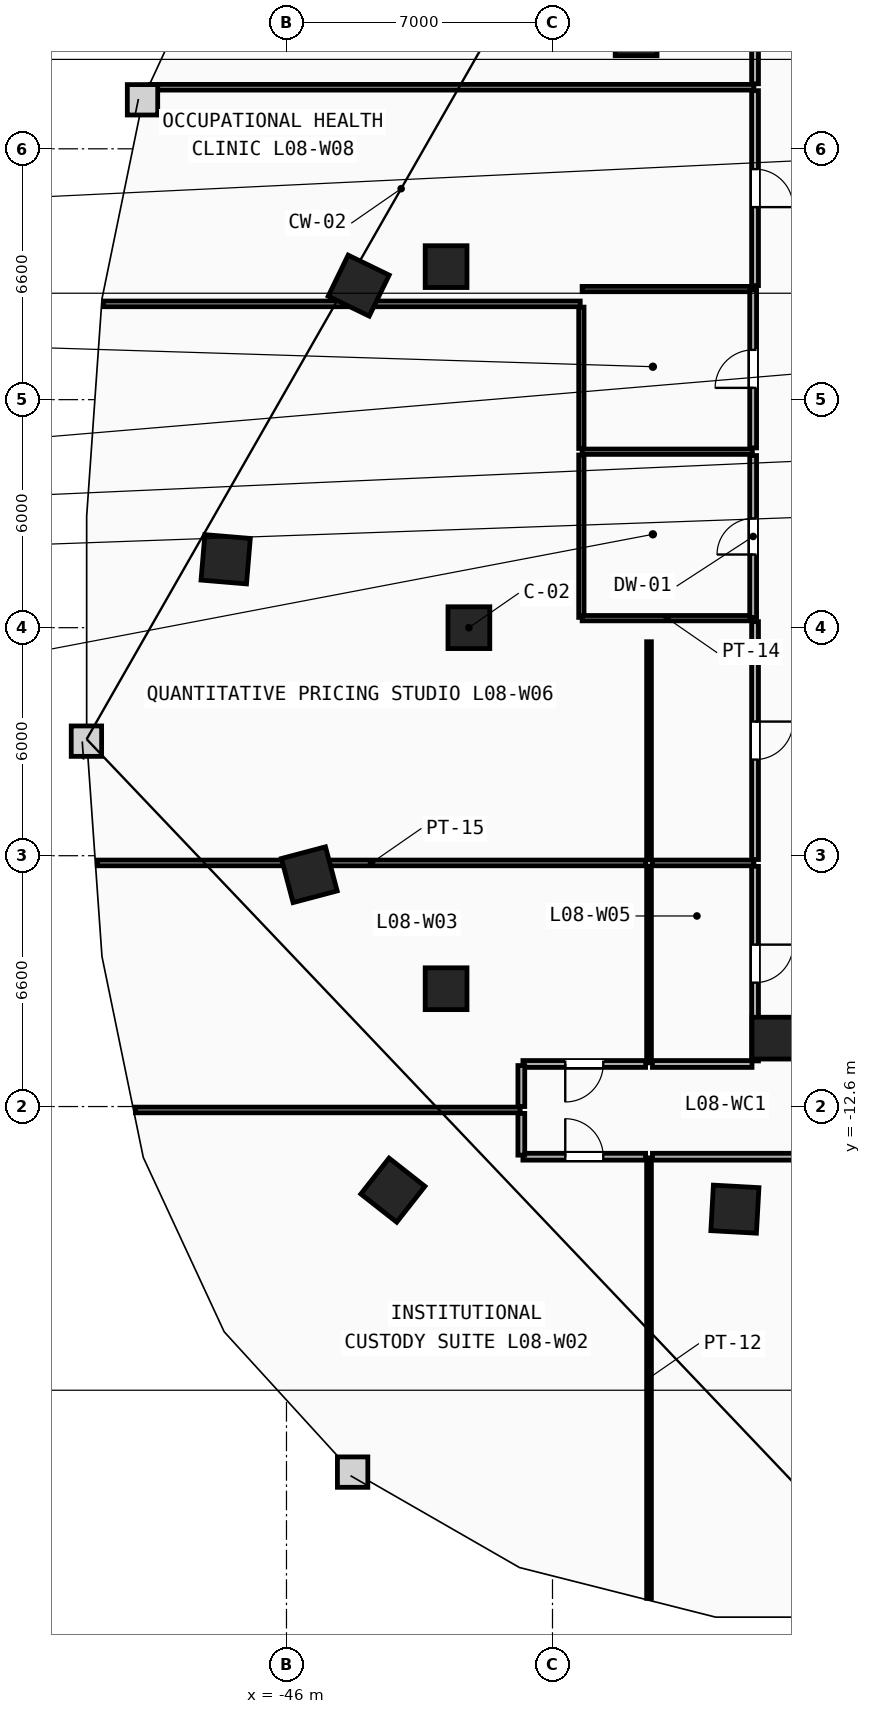
"""IFC4 building model, lengths in metres.
Left out: names, types, materials, properties, quantities, classifications, styles, units other than length and angle.
Written with IfcOpenShell. Run it as: python <this file> out.ifc"""

import sys

from ifc_helpers import new_model, si_unit, direction, frame, frame_2d, origin, origin_2d, place, context, subcontext, project, spatial, rectangle, extrude, element, fill, save


model = new_model("IFC4")
c1 = context("Model", 3, precision=1e-05, world=origin(), true_north=direction((0.0, 1.0)))
c2 = subcontext(c1, "Body", "Model", "MODEL_VIEW")
j1 = project(units=[si_unit("LENGTHUNIT", "METRE"), si_unit("PLANEANGLEUNIT", "RADIAN")], contexts=[c1])
p1 = place(None, origin())
s1 = spatial("IfcSite", under=j1, at=p1, CompositionType="ELEMENT")
p2 = place(p1, origin())
s2 = spatial("IfcBuilding", under=s1, at=p2, CompositionType="ELEMENT")
p3 = place(p2, frame((0.0, 0.0, 35.4)))
s3 = spatial("IfcBuildingStorey", under=s2, at=p3, CompositionType="ELEMENT", Elevation=35.4)
for number, where, z_axis, x_axis in (
    (1, (-41.2, 0.0, 0.0), (0.0, 0.0, 1.0), (1.0, 0.0, 0.0)),
    (2, (-41.8, 9.5, 0.0), (0.0, 0.0, 1.0), (1.0, 0.0, 0.0)),
    (3, (-36.8, 15.6, 0.0), (0.0, 0.0, 1.0), (1.0, 0.0, 0.0)),
    (4, (-41.8, -9.5, 0.0), (0.0, 0.0, 1.0), (1.0, 0.0, 0.0)),
    (5, (-33.2, -10.8, 0.0), (0.0, 0.0, 1.0), (1.0, 0.0, 0.0)),
):
    element("IfcColumn", number, at=place(p3, frame(where, z_axis=z_axis, x_axis=x_axis)), inside=s3, PredefinedType="COLUMN", context=c2, shape_type="SweptSolid", body=[
        extrude(rectangle(XDim=1.1, YDim=1.1, at=origin_2d()), origin(), (0.0, 0.0, 1.0), 3.8),
    ])
for number, where, z_axis, x_axis in (
    (6, (-44.1, 9.0, 0.0), (0.0, 0.0, 1.0), (-0.437, -0.899, 0.0)),
    (7, (-47.6, 1.8, 0.0), (0.0, 0.0, 1.0), (-0.084, -0.997, 0.0)),
    (8, (-45.4, -6.5, 0.0), (0.0, 0.0, 1.0), (0.256, -0.967, 0.0)),
    (9, (-43.2, -14.8, 0.0), (0.0, 0.0, 1.0), (0.786, -0.618, 0.0)),
    (10, (-34.2, -15.3, 0.0), (0.0, 0.0, 1.0), (0.998, -0.055, 0.0)),
):
    element("IfcColumn", number, at=place(p3, frame(where, z_axis=z_axis, x_axis=x_axis)), inside=s3, PredefinedType="COLUMN", context=c2, shape_type="SweptSolid", body=[
        extrude(rectangle(XDim=1.2, YDim=1.2, at=origin_2d()), origin(), (0.0, 0.0, 1.0), 3.8),
    ])
p4 = place(p3, frame((-38.24, 0.27, 0.0), z_axis=(0.0, 0.0, 1.0), x_axis=(0.0, 1.0, 0.0)))
e11 = element("IfcWall", 11, at=p4, inside=s3, PredefinedType="PARTITIONING", context=c2, shape_type="SweptSolid", body=[
    extrude(rectangle(XDim=4.275, YDim=0.14, at=frame_2d((2.137, 0.0))), origin(), (0.0, 0.0, 1.0), 3.5),
])
p5 = place(p3, frame((-38.24, 4.715, 0.0), z_axis=(0.0, 0.0, 1.0), x_axis=(0.0, 1.0, 0.0)))
e12 = element("IfcWall", 12, at=p5, inside=s3, PredefinedType="PARTITIONING", context=c2, shape_type="SweptSolid", body=[
    extrude(rectangle(XDim=3.72, YDim=0.14, at=frame_2d((1.86, 0.0))), origin(), (0.0, 0.0, 1.0), 3.5),
])
for number, where, z_axis, x_axis in (
    (13, (-38.22, 0.25, 0.0), (0.0, 0.0, 1.0), (1.0, 0.0, 0.0)),
    (14, (-38.22, 4.63, 0.0), (0.0, 0.0, 1.0), (1.0, 0.0, 0.0)),
    (15, (-38.22, 8.91, 0.0), (0.0, 0.0, 1.0), (1.0, 0.0, 0.0)),
):
    element("IfcWall", number, at=place(p3, frame(where, z_axis=z_axis, x_axis=x_axis)), inside=s3, PredefinedType="PARTITIONING", context=c2, shape_type="SweptSolid", body=[
        extrude(rectangle(XDim=4.48, YDim=0.14, at=frame_2d((2.24, 0.0))), origin(), (0.0, 0.0, 1.0), 3.5),
    ])
p6 = place(p3, frame((-33.72, 0.27, 0.0), z_axis=(0.0, 0.0, 1.0), x_axis=(0.0, 1.0, 0.0)))
e16 = element("IfcWall", 16, at=p6, inside=s3, PredefinedType="PARTITIONING", context=c2, shape_type="SweptSolid", body=[
    extrude(rectangle(XDim=4.26, YDim=0.18, at=frame_2d((2.13, 0.0))), origin(), (0.0, 0.0, 1.0), 3.5),
])
p7 = place(p6, frame((1.655, 0.0, 0.0)))
e17 = element("IfcOpeningElement", 17, at=p7, cuts=e16, PredefinedType="OPENING", context=c2, shape_type="SweptSolid", body=[
    extrude(rectangle(XDim=0.95, YDim=2.1, at=frame_2d((0.475, 1.05))), frame((0.0, 0.1, 0.0), z_axis=(0.0, -1.0, 0.0), x_axis=(1.0, 0.0, 0.0)), (0.0, 0.0, 1.0), 0.2),
])
p8 = place(p3, frame((-33.72, 4.73, 0.0), z_axis=(0.0, 0.0, 1.0), x_axis=(0.0, 1.0, 0.0)))
e18 = element("IfcWall", 18, at=p8, inside=s3, PredefinedType="PARTITIONING", context=c2, shape_type="SweptSolid", body=[
    extrude(rectangle(XDim=4.16, YDim=0.18, at=frame_2d((2.08, 0.0))), origin(), (0.0, 0.0, 1.0), 3.5),
])
p9 = place(p8, frame((1.58, 0.0, 0.0)))
e19 = element("IfcOpeningElement", 19, at=p9, cuts=e18, PredefinedType="OPENING", context=c2, shape_type="SweptSolid", body=[
    extrude(rectangle(XDim=1.0, YDim=2.15, at=frame_2d((0.5, 1.075))), frame((0.0, 0.1, 0.0), z_axis=(0.0, -1.0, 0.0), x_axis=(1.0, 0.0, 0.0)), (0.0, 0.0, 1.0), 0.2),
])
p10 = place(p3, frame((-36.46, -25.541, 0.0), z_axis=(0.0, 0.0, 1.0), x_axis=(0.0, 1.0, 0.0)))
e20 = element("IfcWall", 20, at=p10, inside=s3, PredefinedType="PARTITIONING", context=c2, shape_type="SweptSolid", body=[
    extrude(rectangle(XDim=11.591, YDim=0.125, at=frame_2d((5.795, 0.0))), origin(), (0.0, 0.0, 1.0), 3.5),
])
p11 = place(p3, frame((-36.46, -11.45, 0.0), z_axis=(0.0, 0.0, 1.0), x_axis=(0.0, 1.0, 0.0)))
e21 = element("IfcWall", 21, at=p11, inside=s3, PredefinedType="PARTITIONING", context=c2, shape_type="SweptSolid", body=[
    extrude(rectangle(XDim=5.175, YDim=0.125, at=frame_2d((2.587, 0.0))), origin(), (0.0, 0.0, 1.0), 3.5),
])
p12 = place(p3, frame((-36.46, -6.105, 0.0), z_axis=(0.0, 0.0, 1.0), x_axis=(0.0, 1.0, 0.0)))
e22 = element("IfcWall", 22, at=p12, inside=s3, PredefinedType="PARTITIONING", context=c2, shape_type="SweptSolid", body=[
    extrude(rectangle(XDim=5.735, YDim=0.125, at=frame_2d((2.867, 0.0))), origin(), (0.0, 0.0, 1.0), 3.5),
])
p13 = place(p3, frame((-50.979, -6.19, 0.0), z_axis=(0.0, 0.0, 1.0), x_axis=(1.0, 0.0, 0.0)))
e23 = element("IfcWall", 23, at=p13, inside=s3, PredefinedType="PARTITIONING", context=c2, shape_type="SweptSolid", body=[
    extrude(rectangle(XDim=14.434, YDim=0.15, at=frame_2d((7.217, 0.0))), origin(), (0.0, 0.0, 1.0), 3.5),
])
p14 = place(p3, frame((-36.375, -6.19, 0.0), z_axis=(0.0, 0.0, 1.0), x_axis=(1.0, 0.0, 0.0)))
e24 = element("IfcWall", 24, at=p14, inside=s3, PredefinedType="PARTITIONING", context=c2, shape_type="SweptSolid", body=[
    extrude(rectangle(XDim=2.675, YDim=0.15, at=frame_2d((1.337, 0.0))), origin(), (0.0, 0.0, 1.0), 3.5),
])
p15 = place(p3, frame((-49.974, -12.69, 0.0), z_axis=(0.0, 0.0, 1.0), x_axis=(1.0, 0.0, 0.0)))
e25 = element("IfcWall", 25, at=p15, inside=s3, PredefinedType="PARTITIONING", context=c2, shape_type="SweptSolid", body=[
    extrude(rectangle(XDim=10.124, YDim=0.15, at=frame_2d((5.062, 0.0))), origin(), (0.0, 0.0, 1.0), 3.5),
])
p16 = place(p3, frame((-50.814, 8.52, 0.0), z_axis=(0.0, 0.0, 1.0), x_axis=(1.0, 0.0, 0.0)))
e26 = element("IfcWall", 26, at=p16, inside=s3, PredefinedType="PARTITIONING", context=c2, shape_type="SweptSolid", body=[
    extrude(rectangle(XDim=12.544, YDim=0.15, at=frame_2d((6.272, 0.0))), origin(), (0.0, 0.0, 1.0), 3.5),
])
p17 = place(p3, frame((-49.585, 14.22, 0.0), z_axis=(0.0, 0.0, 1.0), x_axis=(1.0, 0.0, 0.0)))
e27 = element("IfcWall", 27, at=p17, inside=s3, PredefinedType="PARTITIONING", context=c2, shape_type="SweptSolid", body=[
    extrude(rectangle(XDim=15.885, YDim=0.15, at=frame_2d((7.942, 0.0))), origin(), (0.0, 0.0, 1.0), 3.5),
])
p18 = place(p3, frame((-36.37, -13.92, 0.0), z_axis=(0.0, 0.0, 1.0), x_axis=(1.0, 0.0, 0.0)))
e28 = element("IfcWall", 28, at=p18, inside=s3, PredefinedType="PARTITIONING", context=c2, shape_type="SweptSolid", body=[
    extrude(rectangle(XDim=11.149, YDim=0.18, at=frame_2d((5.574, 0.0))), origin(), (0.0, 0.0, 1.0), 3.5),
])
p19 = place(p18, frame((5.074, 0.0, 0.0)))
e29 = element("IfcOpeningElement", 29, at=p19, cuts=e28, PredefinedType="OPENING", context=c2, shape_type="SweptSolid", body=[
    extrude(rectangle(XDim=1.0, YDim=2.15, at=frame_2d((0.5, 1.075))), frame((0.0, 0.1, 0.0), z_axis=(0.0, -1.0, 0.0), x_axis=(1.0, 0.0, 0.0)), (0.0, 0.0, 1.0), 0.2),
])
p20 = place(p3, frame((-39.779, -13.92, 0.0), z_axis=(0.0, 0.0, 1.0), x_axis=(1.0, 0.0, 0.0)))
e30 = element("IfcWall", 30, at=p20, inside=s3, PredefinedType="PARTITIONING", context=c2, shape_type="SweptSolid", body=[
    extrude(rectangle(XDim=3.229, YDim=0.18, at=frame_2d((1.614, 0.0))), origin(), (0.0, 0.0, 1.0), 3.5),
])
p21 = place(p20, frame((1.114, 0.0, 0.0)))
e31 = element("IfcOpeningElement", 31, at=p21, cuts=e30, PredefinedType="OPENING", context=c2, shape_type="SweptSolid", body=[
    extrude(rectangle(XDim=1.0, YDim=2.15, at=frame_2d((0.5, 1.075))), frame((0.0, 0.1, 0.0), z_axis=(0.0, -1.0, 0.0), x_axis=(1.0, 0.0, 0.0)), (0.0, 0.0, 1.0), 0.2),
])
p22 = place(p3, frame((-39.82, -12.78, 0.0), z_axis=(0.0, 0.0, 1.0), x_axis=(0.0, -1.0, 0.0)))
e32 = element("IfcWall", 32, at=p22, inside=s3, PredefinedType="PARTITIONING", context=c2, shape_type="SweptSolid", body=[
    extrude(rectangle(XDim=1.098, YDim=0.18, at=frame_2d((0.549, 0.0))), origin(), (0.0, 0.0, 1.0), 3.5),
])
p23 = place(p3, frame((-36.55, -11.48, 0.0), z_axis=(0.0, 0.0, 1.0), x_axis=(-1.0, 0.0, 0.0)))
e33 = element("IfcWall", 33, at=p23, inside=s3, PredefinedType="PARTITIONING", context=c2, shape_type="SweptSolid", body=[
    extrude(rectangle(XDim=3.229, YDim=0.18, at=frame_2d((1.614, 0.0))), origin(), (0.0, 0.0, 1.0), 3.5),
])
p24 = place(p23, frame((1.114, 0.0, 0.0)))
e34 = element("IfcOpeningElement", 34, at=p24, cuts=e33, PredefinedType="OPENING", context=c2, shape_type="SweptSolid", body=[
    extrude(rectangle(XDim=1.0, YDim=2.15, at=frame_2d((0.5, 1.075))), frame((0.0, 0.1, 0.0), z_axis=(0.0, -1.0, 0.0), x_axis=(1.0, 0.0, 0.0)), (0.0, 0.0, 1.0), 0.2),
])
p25 = place(p3, frame((-39.82, -11.521, 0.0), z_axis=(0.0, 0.0, 1.0), x_axis=(0.0, -1.0, 0.0)))
e35 = element("IfcWall", 35, at=p25, inside=s3, PredefinedType="PARTITIONING", context=c2, shape_type="SweptSolid", body=[
    extrude(rectangle(XDim=1.079, YDim=0.18, at=frame_2d((0.539, 0.0))), origin(), (0.0, 0.0, 1.0), 3.5),
])
p26 = place(p3, frame((-33.67, -6.28, 0.0), z_axis=(0.0, 0.0, 1.0), x_axis=(0.0, -1.0, 0.0)))
e36 = element("IfcWall", 36, at=p26, inside=s3, PredefinedType="PARTITIONING", context=c2, shape_type="SweptSolid", body=[
    extrude(rectangle(XDim=5.12, YDim=0.18, at=frame_2d((2.56, 0.0))), origin(), (0.0, 0.0, 1.0), 3.5),
])
p27 = place(p26, frame((2.06, 0.0, 0.0)))
e37 = element("IfcOpeningElement", 37, at=p27, cuts=e36, PredefinedType="OPENING", context=c2, shape_type="SweptSolid", body=[
    extrude(rectangle(XDim=1.0, YDim=2.15, at=frame_2d((0.5, 1.075))), frame((0.0, 0.1, 0.0), z_axis=(0.0, -1.0, 0.0), x_axis=(1.0, 0.0, 0.0)), (0.0, 0.0, 1.0), 0.2),
])
p28 = place(p3, frame((-33.75, -11.48, 0.0), z_axis=(0.0, 0.0, 1.0), x_axis=(-1.0, 0.0, 0.0)))
e38 = element("IfcWall", 38, at=p28, inside=s3, PredefinedType="PARTITIONING", context=c2, shape_type="SweptSolid", body=[
    extrude(rectangle(XDim=2.62, YDim=0.18, at=frame_2d((1.31, 0.0))), origin(), (0.0, 0.0, 1.0), 3.5),
])
p29 = place(p3, frame((-33.67, 0.159, 0.0), z_axis=(0.0, 0.0, 1.0), x_axis=(0.0, -1.0, 0.0)))
e39 = element("IfcWall", 39, at=p29, inside=s3, PredefinedType="PARTITIONING", context=c2, shape_type="SweptSolid", body=[
    extrude(rectangle(XDim=6.259, YDim=0.18, at=frame_2d((3.129, 0.0))), origin(), (0.0, 0.0, 1.0), 3.5),
])
p30 = place(p29, frame((2.629, 0.0, 0.0)))
e40 = element("IfcOpeningElement", 40, at=p30, cuts=e39, PredefinedType="OPENING", context=c2, shape_type="SweptSolid", body=[
    extrude(rectangle(XDim=1.0, YDim=2.15, at=frame_2d((0.5, 1.075))), frame((0.0, 0.1, 0.0), z_axis=(0.0, -1.0, 0.0), x_axis=(1.0, 0.0, 0.0)), (0.0, 0.0, 1.0), 0.2),
])
p31 = place(p3, frame((-33.67, 14.13, 0.0), z_axis=(0.0, 0.0, 1.0), x_axis=(0.0, -1.0, 0.0)))
e41 = element("IfcWall", 41, at=p31, inside=s3, PredefinedType="PARTITIONING", context=c2, shape_type="SweptSolid", body=[
    extrude(rectangle(XDim=5.128, YDim=0.18, at=frame_2d((2.564, 0.0))), origin(), (0.0, 0.0, 1.0), 3.5),
])
p32 = place(p31, frame((2.064, 0.0, 0.0)))
e42 = element("IfcOpeningElement", 42, at=p32, cuts=e41, PredefinedType="OPENING", context=c2, shape_type="SweptSolid", body=[
    extrude(rectangle(XDim=1.0, YDim=2.15, at=frame_2d((0.5, 1.075))), frame((0.0, 0.1, 0.0), z_axis=(0.0, -1.0, 0.0), x_axis=(1.0, 0.0, 0.0)), (0.0, 0.0, 1.0), 0.2),
])
p33 = place(p3, frame((-33.67, 17.428, 0.0), z_axis=(0.0, 0.0, 1.0), x_axis=(0.0, -1.0, 0.0)))
e43 = element("IfcWall", 43, at=p33, inside=s3, PredefinedType="PARTITIONING", context=c2, shape_type="SweptSolid", body=[
    extrude(rectangle(XDim=3.118, YDim=0.18, at=frame_2d((1.559, 0.0))), origin(), (0.0, 0.0, 1.0), 3.5),
])
p34 = place(p30, origin())
e44 = element("IfcDoor", 44, at=p34, inside=s3, OperationType="SINGLE_SWING_LEFT", PredefinedType="DOOR", context=c2, shape_type="SweptSolid", body=[
    extrude(rectangle(XDim=1.0, YDim=2.15, at=frame_2d((0.5, 1.075))), frame((0.0, 0.025, 0.0), z_axis=(0.0, -1.0, 0.0), x_axis=(1.0, 0.0, 0.0)), (0.0, 0.0, 1.0), 0.05),
])
fill(e40, e44)
p35 = place(p32, origin())
e45 = element("IfcDoor", 45, at=p35, inside=s3, OperationType="SINGLE_SWING_RIGHT", PredefinedType="DOOR", context=c2, shape_type="SweptSolid", body=[
    extrude(rectangle(XDim=1.0, YDim=2.15, at=frame_2d((0.5, 1.075))), frame((0.0, 0.025, 0.0), z_axis=(0.0, -1.0, 0.0), x_axis=(1.0, 0.0, 0.0)), (0.0, 0.0, 1.0), 0.05),
])
fill(e42, e45)
p36 = place(p27, origin())
e46 = element("IfcDoor", 46, at=p36, inside=s3, OperationType="SINGLE_SWING_LEFT", PredefinedType="DOOR", context=c2, shape_type="SweptSolid", body=[
    extrude(rectangle(XDim=1.0, YDim=2.15, at=frame_2d((0.5, 1.075))), frame((0.0, 0.025, 0.0), z_axis=(0.0, -1.0, 0.0), x_axis=(1.0, 0.0, 0.0)), (0.0, 0.0, 1.0), 0.05),
])
fill(e37, e46)
p37 = place(p7, origin())
e47 = element("IfcDoor", 47, at=p37, inside=s3, OperationType="SINGLE_SWING_LEFT", PredefinedType="DOOR", context=c2, shape_type="SweptSolid", body=[
    extrude(rectangle(XDim=0.95, YDim=2.1, at=frame_2d((0.475, 1.05))), frame((0.0, 0.025, 0.0), z_axis=(0.0, -1.0, 0.0), x_axis=(1.0, 0.0, 0.0)), (0.0, 0.0, 1.0), 0.05),
])
fill(e17, e47)
p38 = place(p9, origin())
e48 = element("IfcDoor", 48, at=p38, inside=s3, OperationType="SINGLE_SWING_LEFT", PredefinedType="DOOR", context=c2, shape_type="SweptSolid", body=[
    extrude(rectangle(XDim=1.0, YDim=2.15, at=frame_2d((0.5, 1.075))), frame((0.0, 0.025, 0.0), z_axis=(0.0, -1.0, 0.0), x_axis=(1.0, 0.0, 0.0)), (0.0, 0.0, 1.0), 0.05),
])
fill(e19, e48)
p39 = place(p21, origin())
e49 = element("IfcDoor", 49, at=p39, inside=s3, OperationType="SINGLE_SWING_LEFT", PredefinedType="DOOR", context=c2, shape_type="SweptSolid", body=[
    extrude(rectangle(XDim=1.0, YDim=2.15, at=frame_2d((0.5, 1.075))), frame((0.0, 0.025, 0.0), z_axis=(0.0, -1.0, 0.0), x_axis=(1.0, 0.0, 0.0)), (0.0, 0.0, 1.0), 0.05),
])
fill(e31, e49)
p40 = place(p24, origin())
e50 = element("IfcDoor", 50, at=p40, inside=s3, OperationType="SINGLE_SWING_RIGHT", PredefinedType="DOOR", context=c2, shape_type="SweptSolid", body=[
    extrude(rectangle(XDim=1.0, YDim=2.15, at=frame_2d((0.5, 1.075))), frame((0.0, 0.025, 0.0), z_axis=(0.0, -1.0, 0.0), x_axis=(1.0, 0.0, 0.0)), (0.0, 0.0, 1.0), 0.05),
])
fill(e34, e50)
save(model, sys.argv[1])
